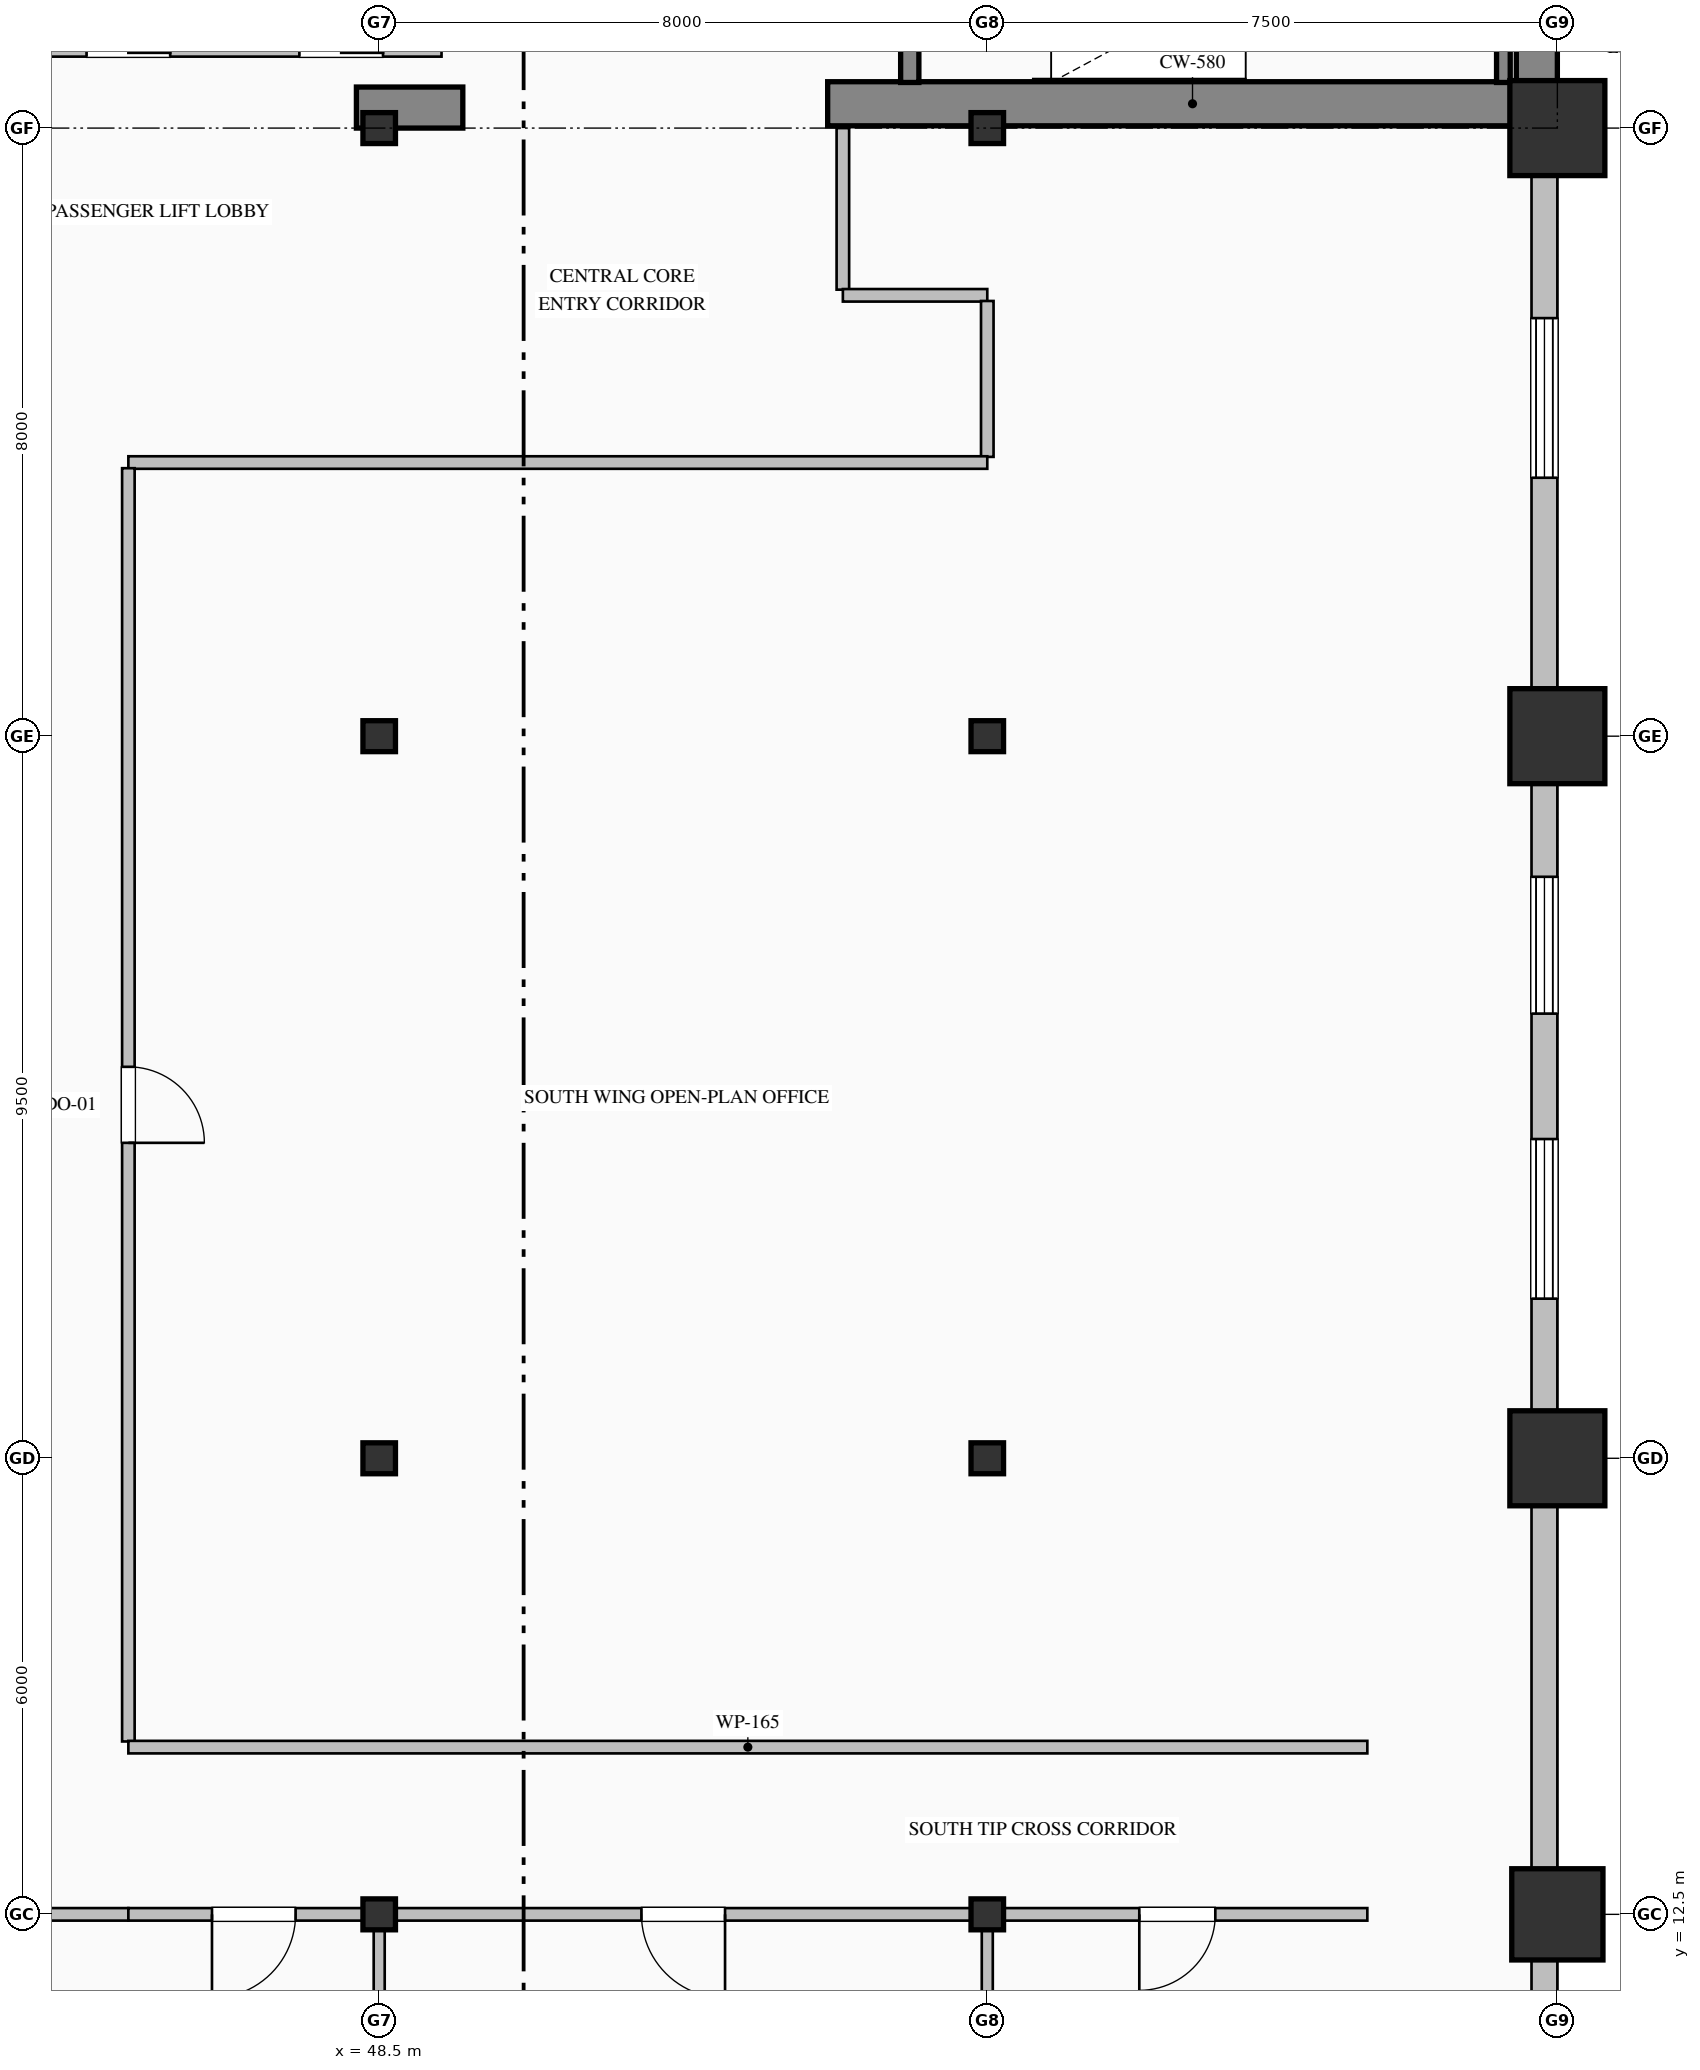
"""IFC4 building model, lengths in metres.
Left out: names, types, materials, properties, quantities, classifications, styles, units other than length and angle.
Written with IfcOpenShell. Run it as: python <this file> out.ifc"""

import sys

from ifc_helpers import new_model, si_unit, direction, frame, frame_2d, origin, origin_2d, place, context, subcontext, project, spatial, rectangle, hollow_rectangle, hollow_circle, i_section, extrude, element, fill, save


model = new_model("IFC4")
c1 = context("Model", 3, precision=1e-05, world=origin(), true_north=direction((0.0, 1.0)))
c2 = subcontext(c1, "Body", "Model", "MODEL_VIEW")
j1 = project(units=[si_unit("LENGTHUNIT", "METRE"), si_unit("PLANEANGLEUNIT", "RADIAN")], contexts=[c1])
p1 = place(None, origin())
s1 = spatial("IfcSite", under=j1, at=p1, CompositionType="ELEMENT")
p2 = place(p1, origin())
s2 = spatial("IfcBuilding", under=s1, at=p2, CompositionType="ELEMENT")
p3 = place(p2, frame((0.0, 0.0, 44.2)))
s3 = spatial("IfcBuildingStorey", under=s2, at=p3, CompositionType="ELEMENT", Elevation=44.2)
p4 = place(p3, frame((63.73, 36.32, 0.0), z_axis=(0.0, 0.0, 1.0), x_axis=(0.0, 1.0, 0.0)))
e1 = element("IfcWall", 1, at=p4, inside=s3, PredefinedType="SHEAR", context=c2, shape_type="SweptSolid", body=[
    extrude(rectangle(XDim=15.14, YDim=0.54, at=frame_2d((7.57, 0.0))), origin(), (0.0, 0.0, 1.0), 3.75),
])
p5 = place(p3, frame((48.2, 36.27, 0.0), z_axis=(0.0, 0.0, 1.0), x_axis=(1.0, 0.0, 0.0)))
e2 = element("IfcWall", 2, at=p5, inside=s3, PredefinedType="SHEAR", context=c2, shape_type="SweptSolid", body=[
    extrude(rectangle(XDim=1.4, YDim=0.54, at=frame_2d((0.7, 0.0))), origin(), (0.0, 0.0, 1.0), 3.75),
])
p6 = place(p3, frame((54.4, 36.32, 0.0), z_axis=(0.0, 0.0, 1.0), x_axis=(1.0, 0.0, 0.0)))
e3 = element("IfcWall", 3, at=p6, inside=s3, PredefinedType="SHEAR", context=c2, shape_type="SweptSolid", body=[
    extrude(rectangle(XDim=9.6, YDim=0.58, at=frame_2d((4.8, 0.0))), origin(), (0.0, 0.0, 1.0), 4.0),
])
for number, where, z_axis, x_axis in (
    (4, (48.5, 12.5, 0.0), (0.0, 0.0, 1.0), (1.0, 0.0, 0.0)),
    (5, (48.5, 18.5, 0.0), (0.0, 0.0, 1.0), (1.0, 0.0, 0.0)),
    (6, (48.5, 28.0, 0.0), (0.0, 0.0, 1.0), (1.0, 0.0, 0.0)),
    (7, (48.5, 36.0, 0.0), (0.0, 0.0, 1.0), (1.0, 0.0, 0.0)),
    (8, (56.5, 12.5, 0.0), (0.0, 0.0, 1.0), (1.0, 0.0, 0.0)),
    (9, (56.5, 18.5, 0.0), (0.0, 0.0, 1.0), (1.0, 0.0, 0.0)),
    (10, (56.5, 28.0, 0.0), (0.0, 0.0, 1.0), (1.0, 0.0, 0.0)),
    (11, (56.5, 36.0, 0.0), (0.0, 0.0, 1.0), (1.0, 0.0, 0.0)),
):
    element("IfcColumn", number, at=place(p3, frame(where, z_axis=z_axis, x_axis=x_axis)), inside=s3, PredefinedType="COLUMN", context=c2, shape_type="SweptSolid", body=[
        extrude(i_section(OverallWidth=0.407, OverallDepth=0.428, WebThickness=0.02, FlangeThickness=0.035, FilletRadius=0.022, at=origin_2d()), origin(), (0.0, 0.0, 1.0), 4.0),
    ])
p7 = place(p3, frame((64.0, 12.5, 0.0), z_axis=(0.0, 0.0, 1.0), x_axis=(1.0, 0.0, 0.0)))
e12 = element("IfcColumn", 12, at=p7, inside=s3, PredefinedType="COLUMN", context=c2, shape_type="SweptSolid", body=[
    extrude(hollow_circle(Radius=0.6, WallThickness=0.04, at=origin_2d()), origin(), (0.0, 0.0, 1.0), 4.0),
])
for number, where, z_axis, x_axis in (
    (13, (64.0, 18.5, 0.0), (0.0, 0.0, 1.0), (1.0, 0.0, 0.0)),
    (14, (64.0, 28.0, 0.0), (0.0, 0.0, 1.0), (1.0, 0.0, 0.0)),
    (15, (64.0, 36.0, 0.0), (0.0, 0.0, 1.0), (1.0, 0.0, 0.0)),
):
    element("IfcColumn", number, at=place(p3, frame(where, z_axis=z_axis, x_axis=x_axis)), inside=s3, PredefinedType="COLUMN", context=c2, shape_type="SweptSolid", body=[
        extrude(hollow_rectangle(XDim=1.25, YDim=1.25, WallThickness=0.045, at=origin_2d()), origin(), (0.0, 0.0, 1.0), 4.0),
    ])
p8 = place(p3, frame((63.83, 36.05, 0.0), z_axis=(0.0, 0.0, 1.0), x_axis=(0.0, -1.0, 0.0)))
e16 = element("IfcWall", 16, at=p8, inside=s3, PredefinedType="SOLIDWALL", context=c2, shape_type="SweptSolid", body=[
    extrude(rectangle(XDim=28.05, YDim=0.34, at=frame_2d((14.025, 0.0))), origin(), (0.0, 0.0, 1.0), 3.25),
])
p9 = place(p8, frame((2.55, 0.0, 0.85)))
e17 = element("IfcOpeningElement", 17, at=p9, cuts=e16, PredefinedType="OPENING", context=c2, shape_type="SweptSolid", body=[
    extrude(rectangle(XDim=2.1, YDim=2.05, at=frame_2d((1.05, 1.025))), frame((0.0, 0.18, 0.0), z_axis=(0.0, -1.0, 0.0), x_axis=(1.0, 0.0, 0.0)), (0.0, 0.0, 1.0), 0.36),
])
p10 = place(p8, frame((9.9, 0.0, 0.85)))
e18 = element("IfcOpeningElement", 18, at=p10, cuts=e16, PredefinedType="OPENING", context=c2, shape_type="SweptSolid", body=[
    extrude(rectangle(XDim=1.8, YDim=2.05, at=frame_2d((0.9, 1.025))), frame((0.0, 0.18, 0.0), z_axis=(0.0, -1.0, 0.0), x_axis=(1.0, 0.0, 0.0)), (0.0, 0.0, 1.0), 0.36),
])
p11 = place(p8, frame((13.35, 0.0, 0.85)))
e19 = element("IfcOpeningElement", 19, at=p11, cuts=e16, PredefinedType="OPENING", context=c2, shape_type="SweptSolid", body=[
    extrude(rectangle(XDim=2.1, YDim=2.05, at=frame_2d((1.05, 1.025))), frame((0.0, 0.18, 0.0), z_axis=(0.0, -1.0, 0.0), x_axis=(1.0, 0.0, 0.0)), (0.0, 0.0, 1.0), 0.36),
])
p12 = place(p3, frame((55.48, 39.75, 0.0), z_axis=(0.0, 0.0, 1.0), x_axis=(0.0, -1.0, 0.0)))
e20 = element("IfcWall", 20, at=p12, inside=s3, PredefinedType="SOLIDWALL", context=c2, shape_type="SweptSolid", body=[
    extrude(rectangle(XDim=3.15, YDim=0.24, at=frame_2d((1.575, 0.0))), origin(), (0.0, 0.0, 1.0), 4.0),
])
p13 = place(p12, frame((1.0, 0.0, 0.0)))
e21 = element("IfcOpeningElement", 21, at=p13, cuts=e20, PredefinedType="OPENING", context=c2, shape_type="SweptSolid", body=[
    extrude(rectangle(XDim=1.15, YDim=2.2, at=frame_2d((0.575, 1.1))), frame((0.0, 0.13, 0.0), z_axis=(0.0, -1.0, 0.0), x_axis=(1.0, 0.0, 0.0)), (0.0, 0.0, 1.0), 0.26),
])
p14 = place(p3, frame((63.29, 36.6, 0.0), z_axis=(0.0, 0.0, 1.0), x_axis=(0.0, 1.0, 0.0)))
e22 = element("IfcWall", 22, at=p14, inside=s3, PredefinedType="SOLIDWALL", context=c2, shape_type="SweptSolid", body=[
    extrude(rectangle(XDim=3.15, YDim=0.18, at=frame_2d((1.575, 0.0))), origin(), (0.0, 0.0, 1.0), 4.0),
])
p15 = place(p3, frame((49.32, 37.05, 0.0), z_axis=(0.0, 0.0, 1.0), x_axis=(-1.0, 0.0, 0.0)))
e23 = element("IfcWall", 23, at=p15, inside=s3, PredefinedType="PARTITIONING", context=c2, shape_type="SweptSolid", body=[
    extrude(rectangle(XDim=8.24, YDim=0.22, at=frame_2d((4.12, 0.0))), origin(), (0.0, 0.0, 1.0), 3.75),
])
p16 = place(p15, frame((6.37, 0.0, 0.0)))
e24 = element("IfcOpeningElement", 24, at=p16, cuts=e23, PredefinedType="OPENING", context=c2, shape_type="SweptSolid", body=[
    extrude(rectangle(XDim=1.1, YDim=2.2, at=frame_2d((0.55, 1.1))), frame((0.0, 0.12, 0.0), z_axis=(0.0, -1.0, 0.0), x_axis=(1.0, 0.0, 0.0)), (0.0, 0.0, 1.0), 0.24),
])
p17 = place(p15, frame((3.57, 0.0, 0.0)))
e25 = element("IfcOpeningElement", 25, at=p17, cuts=e23, PredefinedType="OPENING", context=c2, shape_type="SweptSolid", body=[
    extrude(rectangle(XDim=1.1, YDim=2.2, at=frame_2d((0.55, 1.1))), frame((0.0, 0.12, 0.0), z_axis=(0.0, -1.0, 0.0), x_axis=(1.0, 0.0, 0.0)), (0.0, 0.0, 1.0), 0.24),
])
p18 = place(p15, frame((0.77, 0.0, 0.0)))
e26 = element("IfcOpeningElement", 26, at=p18, cuts=e23, PredefinedType="OPENING", context=c2, shape_type="SweptSolid", body=[
    extrude(rectangle(XDim=1.1, YDim=2.2, at=frame_2d((0.55, 1.1))), frame((0.0, 0.12, 0.0), z_axis=(0.0, -1.0, 0.0), x_axis=(1.0, 0.0, 0.0)), (0.0, 0.0, 1.0), 0.24),
])
p19 = place(p3, frame((54.6, 36.0, 0.0), z_axis=(0.0, 0.0, 1.0), x_axis=(0.0, -1.0, 0.0)))
e27 = element("IfcWall", 27, at=p19, inside=s3, PredefinedType="PARTITIONING", context=c2, shape_type="SweptSolid", body=[
    extrude(rectangle(XDim=2.125, YDim=0.165, at=frame_2d((1.063, 0.0))), origin(), (0.0, 0.0, 1.0), 3.75),
])
p20 = place(p3, frame((54.6, 33.8, 0.0), z_axis=(0.0, 0.0, 1.0), x_axis=(1.0, 0.0, 0.0)))
e28 = element("IfcWall", 28, at=p20, inside=s3, PredefinedType="PARTITIONING", context=c2, shape_type="SweptSolid", body=[
    extrude(rectangle(XDim=1.9, YDim=0.165, at=frame_2d((0.95, 0.0))), origin(), (0.0, 0.0, 1.0), 3.75),
])
p21 = place(p3, frame((56.5, 33.726, 0.0), z_axis=(0.0, 0.0, 1.0), x_axis=(0.0, -1.0, 0.0)))
e29 = element("IfcWall", 29, at=p21, inside=s3, PredefinedType="PARTITIONING", context=c2, shape_type="SweptSolid", body=[
    extrude(rectangle(XDim=2.051, YDim=0.165, at=frame_2d((1.025, 0.0))), origin(), (0.0, 0.0, 1.0), 3.042),
])
p22 = place(p3, frame((56.5, 31.6, 0.0), z_axis=(0.0, 0.0, 1.0), x_axis=(-1.0, 0.0, 0.0)))
e30 = element("IfcWall", 30, at=p22, inside=s3, PredefinedType="PARTITIONING", context=c2, shape_type="SweptSolid", body=[
    extrude(rectangle(XDim=11.3, YDim=0.165, at=frame_2d((5.65, 0.0))), origin(), (0.0, 0.0, 1.0), 3.75),
])
p23 = place(p3, frame((45.2, 31.525, 0.0), z_axis=(0.0, 0.0, 1.0), x_axis=(0.0, -1.0, 0.0)))
e31 = element("IfcWall", 31, at=p23, inside=s3, PredefinedType="PARTITIONING", context=c2, shape_type="SweptSolid", body=[
    extrude(rectangle(XDim=16.751, YDim=0.165, at=frame_2d((8.375, 0.0))), origin(), (0.0, 0.0, 1.0), 3.75),
])
p24 = place(p23, frame((7.875, 0.0, 0.0)))
e32 = element("IfcOpeningElement", 32, at=p24, cuts=e31, PredefinedType="OPENING", context=c2, shape_type="SweptSolid", body=[
    extrude(rectangle(XDim=1.0, YDim=2.15, at=frame_2d((0.5, 1.075))), frame((0.0, 0.093, 0.0), z_axis=(0.0, -1.0, 0.0), x_axis=(1.0, 0.0, 0.0)), (0.0, 0.0, 1.0), 0.185),
])
p25 = place(p3, frame((45.2, 12.5, 0.0), z_axis=(0.0, 0.0, 1.0), x_axis=(-1.0, 0.0, 0.0)))
e33 = element("IfcWall", 33, at=p25, inside=s3, PredefinedType="PARTITIONING", context=c2, shape_type="SweptSolid", body=[
    extrude(rectangle(XDim=2.2, YDim=0.165, at=frame_2d((1.1, 0.0))), origin(), (0.0, 0.0, 1.0), 3.042),
])
p26 = place(p3, frame((45.2, 14.7, 0.0), z_axis=(0.0, 0.0, 1.0), x_axis=(1.0, 0.0, 0.0)))
e34 = element("IfcWall", 34, at=p26, inside=s3, PredefinedType="PARTITIONING", context=c2, shape_type="SweptSolid", body=[
    extrude(rectangle(XDim=16.3, YDim=0.165, at=frame_2d((8.15, 0.0))), origin(), (0.0, 0.0, 1.0), 3.75),
])
p27 = place(p3, frame((48.5, 12.5, 0.0), z_axis=(0.0, 0.0, 1.0), x_axis=(-1.0, 0.0, 0.0)))
e35 = element("IfcWall", 35, at=p27, inside=s3, PredefinedType="PARTITIONING", context=c2, shape_type="SweptSolid", body=[
    extrude(rectangle(XDim=3.3, YDim=0.165, at=frame_2d((1.65, 0.0))), origin(), (0.0, 0.0, 1.0), 3.042),
])
p28 = place(p27, frame((1.1, 0.0, 0.0)))
e36 = element("IfcOpeningElement", 36, at=p28, cuts=e35, PredefinedType="OPENING", context=c2, shape_type="SweptSolid", body=[
    extrude(rectangle(XDim=1.1, YDim=2.2, at=frame_2d((0.55, 1.1))), frame((0.0, 0.093, 0.0), z_axis=(0.0, -1.0, 0.0), x_axis=(1.0, 0.0, 0.0)), (0.0, 0.0, 1.0), 0.185),
])
p29 = place(p3, frame((56.5, 12.5, 0.0), z_axis=(0.0, 0.0, 1.0), x_axis=(-1.0, 0.0, 0.0)))
e37 = element("IfcWall", 37, at=p29, inside=s3, PredefinedType="PARTITIONING", context=c2, shape_type="SweptSolid", body=[
    extrude(rectangle(XDim=8.0, YDim=0.165, at=frame_2d((4.0, 0.0))), origin(), (0.0, 0.0, 1.0), 3.042),
])
p30 = place(p29, frame((3.45, 0.0, 0.0)))
e38 = element("IfcOpeningElement", 38, at=p30, cuts=e37, PredefinedType="OPENING", context=c2, shape_type="SweptSolid", body=[
    extrude(rectangle(XDim=1.1, YDim=2.2, at=frame_2d((0.55, 1.1))), frame((0.0, 0.093, 0.0), z_axis=(0.0, -1.0, 0.0), x_axis=(1.0, 0.0, 0.0)), (0.0, 0.0, 1.0), 0.185),
])
p31 = place(p3, frame((61.5, 12.5, 0.0), z_axis=(0.0, 0.0, 1.0), x_axis=(-1.0, 0.0, 0.0)))
e39 = element("IfcWall", 39, at=p31, inside=s3, PredefinedType="PARTITIONING", context=c2, shape_type="SweptSolid", body=[
    extrude(rectangle(XDim=5.0, YDim=0.165, at=frame_2d((2.5, 0.0))), origin(), (0.0, 0.0, 1.0), 3.042),
])
p32 = place(p31, frame((2.0, 0.0, 0.0)))
e40 = element("IfcOpeningElement", 40, at=p32, cuts=e39, PredefinedType="OPENING", context=c2, shape_type="SweptSolid", body=[
    extrude(rectangle(XDim=1.0, YDim=2.15, at=frame_2d((0.5, 1.075))), frame((0.0, 0.093, 0.0), z_axis=(0.0, -1.0, 0.0), x_axis=(1.0, 0.0, 0.0)), (0.0, 0.0, 1.0), 0.185),
])
for number, where, z_axis, x_axis in (
    (41, (48.5, 12.426, 0.0), (0.0, 0.0, 1.0), (0.0, -1.0, 0.0)),
    (42, (56.5, 12.426, 0.0), (0.0, 0.0, 1.0), (0.0, -1.0, 0.0)),
):
    element("IfcWall", number, at=place(p3, frame(where, z_axis=z_axis, x_axis=x_axis)), inside=s3, PredefinedType="PARTITIONING", context=c2, shape_type="SweptSolid", body=[
        extrude(rectangle(XDim=8.094, YDim=0.145, at=frame_2d((4.047, 0.0))), origin(), (0.0, 0.0, 1.0), 3.042),
    ])
p33 = place(p9, origin())
e43 = element("IfcWindow", 43, at=p33, inside=s3, PartitioningType="TRIPLE_PANEL_VERTICAL", PredefinedType="WINDOW", context=c2, shape_type="SweptSolid", body=[
    extrude(rectangle(XDim=2.1, YDim=2.05, at=frame_2d((1.05, 1.025))), frame((0.0, 0.15, 0.0), z_axis=(0.0, -1.0, 0.0), x_axis=(1.0, 0.0, 0.0)), (0.0, 0.0, 1.0), 0.06),
])
fill(e17, e43)
p34 = place(p10, origin())
e44 = element("IfcWindow", 44, at=p34, inside=s3, PartitioningType="TRIPLE_PANEL_VERTICAL", PredefinedType="WINDOW", context=c2, shape_type="SweptSolid", body=[
    extrude(rectangle(XDim=1.8, YDim=2.05, at=frame_2d((0.9, 1.025))), frame((0.0, 0.15, 0.0), z_axis=(0.0, -1.0, 0.0), x_axis=(1.0, 0.0, 0.0)), (0.0, 0.0, 1.0), 0.06),
])
fill(e18, e44)
p35 = place(p11, origin())
e45 = element("IfcWindow", 45, at=p35, inside=s3, PartitioningType="TRIPLE_PANEL_VERTICAL", PredefinedType="WINDOW", context=c2, shape_type="SweptSolid", body=[
    extrude(rectangle(XDim=2.1, YDim=2.05, at=frame_2d((1.05, 1.025))), frame((0.0, 0.15, 0.0), z_axis=(0.0, -1.0, 0.0), x_axis=(1.0, 0.0, 0.0)), (0.0, 0.0, 1.0), 0.06),
])
fill(e19, e45)
p36 = place(p24, origin())
e46 = element("IfcDoor", 46, at=p36, inside=s3, OperationType="SINGLE_SWING_RIGHT", PredefinedType="DOOR", context=c2, shape_type="SweptSolid", body=[
    extrude(rectangle(XDim=1.0, YDim=2.15, at=frame_2d((0.5, 1.075))), frame((0.0, 0.025, 0.0), z_axis=(0.0, -1.0, 0.0), x_axis=(1.0, 0.0, 0.0)), (0.0, 0.0, 1.0), 0.05),
])
fill(e32, e46)
p37 = place(p28, origin())
e47 = element("IfcDoor", 47, at=p37, inside=s3, OperationType="SINGLE_SWING_RIGHT", PredefinedType="DOOR", context=c2, shape_type="SweptSolid", body=[
    extrude(rectangle(XDim=1.1, YDim=2.2, at=frame_2d((0.55, 1.1))), frame((0.0, 0.025, 0.0), z_axis=(0.0, -1.0, 0.0), x_axis=(1.0, 0.0, 0.0)), (0.0, 0.0, 1.0), 0.05),
])
fill(e36, e47)
p38 = place(p30, origin())
e48 = element("IfcDoor", 48, at=p38, inside=s3, OperationType="SINGLE_SWING_LEFT", PredefinedType="DOOR", context=c2, shape_type="SweptSolid", body=[
    extrude(rectangle(XDim=1.1, YDim=2.2, at=frame_2d((0.55, 1.1))), frame((0.0, 0.025, 0.0), z_axis=(0.0, -1.0, 0.0), x_axis=(1.0, 0.0, 0.0)), (0.0, 0.0, 1.0), 0.05),
])
fill(e38, e48)
p39 = place(p32, origin())
e49 = element("IfcDoor", 49, at=p39, inside=s3, OperationType="SINGLE_SWING_RIGHT", PredefinedType="DOOR", context=c2, shape_type="SweptSolid", body=[
    extrude(rectangle(XDim=1.0, YDim=2.15, at=frame_2d((0.5, 1.075))), frame((0.0, 0.025, 0.0), z_axis=(0.0, -1.0, 0.0), x_axis=(1.0, 0.0, 0.0)), (0.0, 0.0, 1.0), 0.05),
])
fill(e40, e49)
save(model, sys.argv[1])
